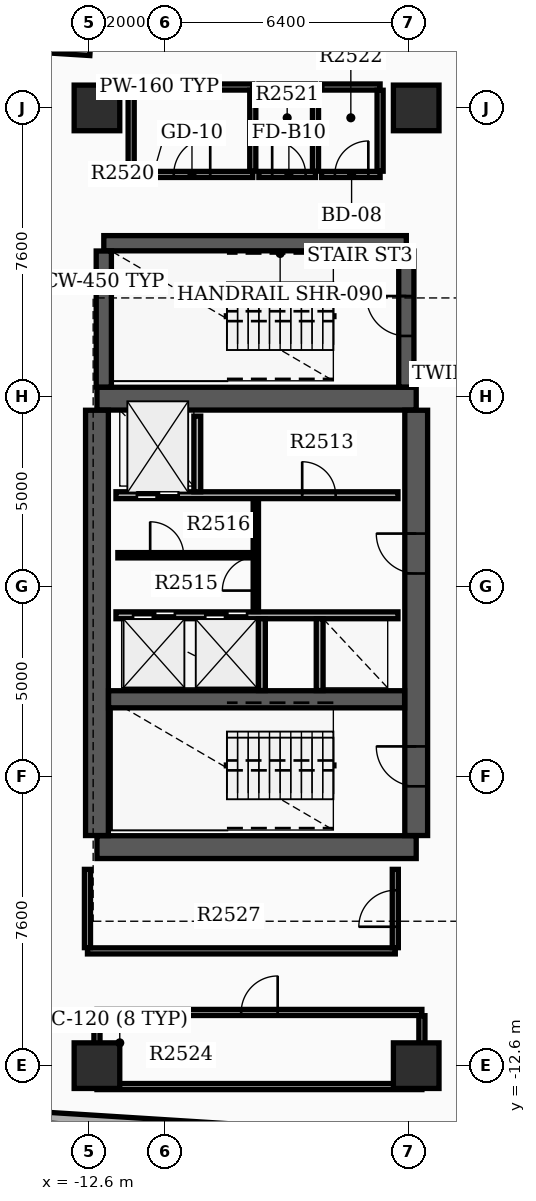
"""IFC4 building model, lengths in metres.
Left out: names, types, materials, properties, quantities, classifications, styles, units other than length and angle.
Written with IfcOpenShell. Run it as: python <this file> out.ifc"""

import sys

from ifc_helpers import new_model, si_unit, direction, frame, frame_2d, origin, origin_2d, place, context, subcontext, project, spatial, rectangle, extrude, element, fill, save


model = new_model("IFC4")
c1 = context("Model", 3, precision=1e-05, world=origin(), true_north=direction((0.0, 1.0)))
c2 = subcontext(c1, "Body", "Model", "MODEL_VIEW")
j1 = project(units=[si_unit("LENGTHUNIT", "METRE"), si_unit("PLANEANGLEUNIT", "RADIAN")], contexts=[c1])
p1 = place(None, origin())
s1 = spatial("IfcSite", under=j1, at=p1, CompositionType="ELEMENT")
p2 = place(p1, origin())
s2 = spatial("IfcBuilding", under=s1, at=p2, CompositionType="ELEMENT")
p3 = place(p2, frame((0.0, 0.0, 160.5)))
s3 = spatial("IfcBuildingStorey", under=s2, at=p3, CompositionType="ELEMENT", Elevation=160.5)
for number, where, z_axis, x_axis in (
    (1, (-12.4, -6.85, 0.0), (0.0, 0.0, 1.0), (1.0, 0.0, 0.0)),
    (2, (-12.4, 4.95, 0.0), (0.0, 0.0, 1.0), (1.0, 0.0, 0.0)),
):
    element("IfcWall", number, at=place(p3, frame(where, z_axis=z_axis, x_axis=x_axis)), inside=s3, PredefinedType="SHEAR", context=c2, shape_type="SweptSolid", body=[
        extrude(rectangle(XDim=8.4, YDim=0.6, at=frame_2d((4.2, 0.0))), origin(), (0.0, 0.0, 1.0), 3.7),
    ])
p4 = place(p3, frame((-12.4, -6.545, 0.0), z_axis=(0.0, 0.0, 1.0), x_axis=(0.0, 1.0, 0.0)))
e3 = element("IfcWall", 3, at=p4, inside=s3, PredefinedType="SHEAR", context=c2, shape_type="SweptSolid", body=[
    extrude(rectangle(XDim=11.19, YDim=0.6, at=frame_2d((5.595, 0.0))), origin(), (0.0, 0.0, 1.0), 3.7),
])
p5 = place(p3, frame((-4.0, -6.545, 0.0), z_axis=(0.0, 0.0, 1.0), x_axis=(0.0, 1.0, 0.0)))
e4 = element("IfcWall", 4, at=p5, inside=s3, PredefinedType="SHEAR", context=c2, shape_type="SweptSolid", body=[
    extrude(rectangle(XDim=11.19, YDim=0.6, at=frame_2d((5.595, 0.0))), origin(), (0.0, 0.0, 1.0), 3.7),
])
p6 = place(p5, frame((1.295, 0.0, 0.0)))
e5 = element("IfcOpeningElement", 5, at=p6, cuts=e4, PredefinedType="OPENING", context=c2, shape_type="SweptSolid", body=[
    extrude(rectangle(XDim=1.05, YDim=2.15, at=frame_2d((0.525, 1.075))), frame((0.0, 0.31, 0.0), z_axis=(0.0, -1.0, 0.0), x_axis=(1.0, 0.0, 0.0)), (0.0, 0.0, 1.0), 0.62),
])
p7 = place(p5, frame((6.895, 0.0, 0.0)))
e6 = element("IfcOpeningElement", 6, at=p7, cuts=e4, PredefinedType="OPENING", context=c2, shape_type="SweptSolid", body=[
    extrude(rectangle(XDim=1.05, YDim=2.15, at=frame_2d((0.525, 1.075))), frame((0.0, 0.31, 0.0), z_axis=(0.0, -1.0, 0.0), x_axis=(1.0, 0.0, 0.0)), (0.0, 0.0, 1.0), 0.62),
])
p8 = place(p3, frame((-12.095, -2.96, 0.0), z_axis=(0.0, 0.0, 1.0), x_axis=(1.0, 0.0, 0.0)))
e7 = element("IfcWall", 7, at=p8, inside=s3, PredefinedType="SHEAR", context=c2, shape_type="SweptSolid", body=[
    extrude(rectangle(XDim=7.79, YDim=0.45, at=frame_2d((3.895, 0.0))), origin(), (0.0, 0.0, 1.0), 3.7),
])
p9 = place(p3, frame((-12.22, 9.04, 0.0), z_axis=(0.0, 0.0, 1.0), x_axis=(1.0, 0.0, 0.0)))
e8 = element("IfcWall", 8, at=p9, inside=s3, PredefinedType="SHEAR", context=c2, shape_type="SweptSolid", body=[
    extrude(rectangle(XDim=7.96, YDim=0.4, at=frame_2d((3.98, 0.0))), origin(), (0.0, 0.0, 1.0), 3.7),
])
p10 = place(p3, frame((-12.22, 5.255, 0.0), z_axis=(0.0, 0.0, 1.0), x_axis=(0.0, 1.0, 0.0)))
e9 = element("IfcWall", 9, at=p10, inside=s3, PredefinedType="SHEAR", context=c2, shape_type="SweptSolid", body=[
    extrude(rectangle(XDim=3.58, YDim=0.4, at=frame_2d((1.79, 0.0))), origin(), (0.0, 0.0, 1.0), 3.7),
])
p11 = place(p3, frame((-4.26, 5.255, 0.0), z_axis=(0.0, 0.0, 1.0), x_axis=(0.0, 1.0, 0.0)))
e10 = element("IfcWall", 10, at=p11, inside=s3, PredefinedType="SHEAR", context=c2, shape_type="SweptSolid", body=[
    extrude(rectangle(XDim=3.58, YDim=0.4, at=frame_2d((1.79, 0.0))), origin(), (0.0, 0.0, 1.0), 3.7),
])
p12 = place(p11, frame((1.345, 0.0, 0.0)))
e11 = element("IfcOpeningElement", 11, at=p12, cuts=e10, PredefinedType="OPENING", context=c2, shape_type="SweptSolid", body=[
    extrude(rectangle(XDim=1.05, YDim=2.15, at=frame_2d((0.525, 1.075))), frame((0.0, 0.21, 0.0), z_axis=(0.0, -1.0, 0.0), x_axis=(1.0, 0.0, 0.0)), (0.0, 0.0, 1.0), 0.42),
])
for number, where, z_axis, x_axis in (
    (12, (-12.4, -12.6, 0.0), (0.0, 0.0, 1.0), (1.0, 0.0, 0.0)),
    (13, (-12.4, 12.6, 0.0), (0.0, 0.0, 1.0), (1.0, 0.0, 0.0)),
    (14, (-4.0, -12.6, 0.0), (0.0, 0.0, 1.0), (1.0, 0.0, 0.0)),
    (15, (-4.0, 12.6, 0.0), (0.0, 0.0, 1.0), (1.0, 0.0, 0.0)),
):
    element("IfcColumn", number, at=place(p3, frame(where, z_axis=z_axis, x_axis=x_axis)), inside=s3, PredefinedType="COLUMN", context=c2, shape_type="SweptSolid", body=[
        extrude(rectangle(XDim=1.2, YDim=1.2, at=origin_2d()), origin(), (0.0, 0.0, 1.0), 3.9),
    ])
p13 = place(p3, frame((-13.796, 14.194, 0.0), z_axis=(0.0, 0.0, 1.0), x_axis=(0.998023660242, -0.06283926796, 0.0)))
e16 = element("IfcWall", 16, at=p13, inside=s3, PredefinedType="STANDARD", context=c2, shape_type="SweptSolid", body=[
    extrude(rectangle(XDim=1.22, YDim=0.28, at=frame_2d((0.61, 0.0))), origin(), (0.0, 0.0, 1.0), 2.97),
])
p14 = place(p3, frame((-14.063, -13.945, 0.0), z_axis=(0.0, 0.0, 1.0), x_axis=(0.998027314704, -0.062781200242, 0.0)))
e17 = element("IfcWall", 17, at=p14, inside=s3, PredefinedType="STANDARD", context=c2, shape_type="SweptSolid", body=[
    extrude(rectangle(XDim=6.3, YDim=0.28, at=frame_2d((3.15, 0.0))), origin(), (0.0, 0.0, 1.0), 2.97),
])
p15 = place(p3, frame((-11.9, 2.41, 0.0), z_axis=(0.0, 0.0, 1.0), x_axis=(1.0, 0.0, 0.0)))
e18 = element("IfcWall", 18, at=p15, inside=s3, PredefinedType="SOLIDWALL", context=c2, shape_type="SweptSolid", body=[
    extrude(rectangle(XDim=7.42, YDim=0.18, at=frame_2d((3.71, 0.0))), origin(), (0.0, 0.0, 1.0), 2.96),
])
p16 = place(p15, frame((0.55, 0.0, 0.0)))
e19 = element("IfcOpeningElement", 19, at=p16, cuts=e18, PredefinedType="OPENING", context=c2, shape_type="SweptSolid", body=[
    extrude(rectangle(XDim=1.1, YDim=2.15, at=frame_2d((0.55, 1.075))), frame((0.0, 0.1, 0.0), z_axis=(0.0, -1.0, 0.0), x_axis=(1.0, 0.0, 0.0)), (0.0, 0.0, 1.0), 0.2),
])
p17 = place(p15, frame((4.9, 0.0, 0.0)))
e20 = element("IfcOpeningElement", 20, at=p17, cuts=e18, PredefinedType="OPENING", context=c2, shape_type="SweptSolid", body=[
    extrude(rectangle(XDim=0.88, YDim=2.1, at=frame_2d((0.44, 1.05))), frame((0.0, 0.1, 0.0), z_axis=(0.0, -1.0, 0.0), x_axis=(1.0, 0.0, 0.0)), (0.0, 0.0, 1.0), 0.2),
])
p18 = place(p3, frame((-11.9, -0.75, 0.0), z_axis=(0.0, 0.0, 1.0), x_axis=(1.0, 0.0, 0.0)))
e21 = element("IfcWall", 21, at=p18, inside=s3, PredefinedType="SOLIDWALL", context=c2, shape_type="SweptSolid", body=[
    extrude(rectangle(XDim=7.42, YDim=0.18, at=frame_2d((3.71, 0.0))), origin(), (0.0, 0.0, 1.0), 2.96),
])
p19 = place(p18, frame((0.45, 0.0, 0.0)))
e22 = element("IfcOpeningElement", 22, at=p19, cuts=e21, PredefinedType="OPENING", context=c2, shape_type="SweptSolid", body=[
    extrude(rectangle(XDim=1.1, YDim=2.15, at=frame_2d((0.55, 1.075))), frame((0.0, 0.1, 0.0), z_axis=(0.0, -1.0, 0.0), x_axis=(1.0, 0.0, 0.0)), (0.0, 0.0, 1.0), 0.2),
])
p20 = place(p18, frame((2.35, 0.0, 0.0)))
e23 = element("IfcOpeningElement", 23, at=p20, cuts=e21, PredefinedType="OPENING", context=c2, shape_type="SweptSolid", body=[
    extrude(rectangle(XDim=1.1, YDim=2.15, at=frame_2d((0.55, 1.075))), frame((0.0, 0.1, 0.0), z_axis=(0.0, -1.0, 0.0), x_axis=(1.0, 0.0, 0.0)), (0.0, 0.0, 1.0), 0.2),
])
p21 = place(p3, frame((-9.76, 2.5, 0.0), z_axis=(0.0, 0.0, 1.0), x_axis=(0.0, 1.0, 0.0)))
e24 = element("IfcWall", 24, at=p21, inside=s3, PredefinedType="SOLIDWALL", context=c2, shape_type="SweptSolid", body=[
    extrude(rectangle(XDim=1.99, YDim=0.18, at=frame_2d((0.995, 0.0))), origin(), (0.0, 0.0, 1.0), 2.96),
])
for number, where, z_axis, x_axis in (
    (25, (-8.06, -2.73, 0.0), (0.0, 0.0, 1.0), (0.0, 1.0, 0.0)),
    (26, (-6.54, -2.73, 0.0), (0.0, 0.0, 1.0), (0.0, 1.0, 0.0)),
):
    element("IfcWall", number, at=place(p3, frame(where, z_axis=z_axis, x_axis=x_axis)), inside=s3, PredefinedType="SOLIDWALL", context=c2, shape_type="SweptSolid", body=[
        extrude(rectangle(XDim=1.89, YDim=0.18, at=frame_2d((0.945, 0.0))), origin(), (0.0, 0.0, 1.0), 2.96),
    ])
p22 = place(p3, frame((-8.22, -0.65, 0.0), z_axis=(0.0, 0.0, 1.0), x_axis=(0.0, 1.0, 0.0)))
e27 = element("IfcWall", 27, at=p22, inside=s3, PredefinedType="SOLIDWALL", context=c2, shape_type="SweptSolid", body=[
    extrude(rectangle(XDim=2.96, YDim=0.14, at=frame_2d((1.48, 0.0))), origin(), (0.0, 0.0, 1.0), 2.96),
])
p23 = place(p22, frame((0.55, 0.0, 0.0)))
e28 = element("IfcOpeningElement", 28, at=p23, cuts=e27, PredefinedType="OPENING", context=c2, shape_type="SweptSolid", body=[
    extrude(rectangle(XDim=0.88, YDim=2.1, at=frame_2d((0.44, 1.05))), frame((0.0, 0.08, 0.0), z_axis=(0.0, -1.0, 0.0), x_axis=(1.0, 0.0, 0.0)), (0.0, 0.0, 1.0), 0.16),
])
p24 = place(p3, frame((-11.85, 0.83, 0.0), z_axis=(0.0, 0.0, 1.0), x_axis=(1.0, 0.0, 0.0)))
e29 = element("IfcWall", 29, at=p24, inside=s3, PredefinedType="PARTITIONING", context=c2, shape_type="SweptSolid", body=[
    extrude(rectangle(XDim=3.552, YDim=0.14, at=frame_2d((1.776, 0.0))), origin(), (0.0, 0.0, 1.0), 2.96),
])
p25 = place(p24, frame((0.85, 0.0, 0.0)))
e30 = element("IfcOpeningElement", 30, at=p25, cuts=e29, PredefinedType="OPENING", context=c2, shape_type="SweptSolid", body=[
    extrude(rectangle(XDim=0.88, YDim=2.1, at=frame_2d((0.44, 1.05))), frame((0.0, 0.08, 0.0), z_axis=(0.0, -1.0, 0.0), x_axis=(1.0, 0.0, 0.0)), (0.0, 0.0, 1.0), 0.16),
])
p26 = place(p3, frame((-11.5, 10.85, 0.0), z_axis=(0.0, 0.0, 1.0), x_axis=(1.0, 0.0, 0.0)))
e31 = element("IfcWall", 31, at=p26, inside=s3, PredefinedType="PARTITIONING", context=c2, shape_type="SweptSolid", body=[
    extrude(rectangle(XDim=3.2, YDim=0.16, at=frame_2d((1.6, 0.0))), origin(), (0.0, 0.0, 1.0), 2.96),
])
p27 = place(p26, frame((1.12, 0.0, 0.0)))
e32 = element("IfcOpeningElement", 32, at=p27, cuts=e31, PredefinedType="OPENING", context=c2, shape_type="SweptSolid", body=[
    extrude(rectangle(XDim=0.96, YDim=2.15, at=frame_2d((0.48, 1.075))), frame((0.0, 0.09, 0.0), z_axis=(0.0, -1.0, 0.0), x_axis=(1.0, 0.0, 0.0)), (0.0, 0.0, 1.0), 0.18),
])
p28 = place(p3, frame((-11.5, 13.15, 0.0), z_axis=(0.0, 0.0, 1.0), x_axis=(1.0, 0.0, 0.0)))
e33 = element("IfcWall", 33, at=p28, inside=s3, PredefinedType="PARTITIONING", context=c2, shape_type="SweptSolid", body=[
    extrude(rectangle(XDim=3.2, YDim=0.16, at=frame_2d((1.6, 0.0))), origin(), (0.0, 0.0, 1.0), 2.96),
])
for number, where, z_axis, x_axis in (
    (34, (-11.5, 10.935, 0.0), (0.0, 0.0, 1.0), (0.0, 1.0, 0.0)),
    (35, (-8.3, 10.935, 0.0), (0.0, 0.0, 1.0), (0.0, 1.0, 0.0)),
):
    element("IfcWall", number, at=place(p3, frame(where, z_axis=z_axis, x_axis=x_axis)), inside=s3, PredefinedType="PARTITIONING", context=c2, shape_type="SweptSolid", body=[
        extrude(rectangle(XDim=2.13, YDim=0.16, at=frame_2d((1.065, 0.0))), origin(), (0.0, 0.0, 1.0), 2.96),
    ])
p29 = place(p3, frame((-8.14, 10.85, 0.0), z_axis=(0.0, 0.0, 1.0), x_axis=(1.0, 0.0, 0.0)))
e36 = element("IfcWall", 36, at=p29, inside=s3, PredefinedType="PARTITIONING", context=c2, shape_type="SweptSolid", body=[
    extrude(rectangle(XDim=1.49, YDim=0.16, at=frame_2d((0.745, 0.0))), origin(), (0.0, 0.0, 1.0), 2.96),
])
p30 = place(p29, frame((0.35, 0.0, 0.0)))
e37 = element("IfcOpeningElement", 37, at=p30, cuts=e36, PredefinedType="OPENING", context=c2, shape_type="SweptSolid", body=[
    extrude(rectangle(XDim=0.88, YDim=2.1, at=frame_2d((0.44, 1.05))), frame((0.0, 0.09, 0.0), z_axis=(0.0, -1.0, 0.0), x_axis=(1.0, 0.0, 0.0)), (0.0, 0.0, 1.0), 0.18),
])
p31 = place(p3, frame((-8.14, 13.15, 0.0), z_axis=(0.0, 0.0, 1.0), x_axis=(1.0, 0.0, 0.0)))
e38 = element("IfcWall", 38, at=p31, inside=s3, PredefinedType="PARTITIONING", context=c2, shape_type="SweptSolid", body=[
    extrude(rectangle(XDim=1.49, YDim=0.16, at=frame_2d((0.745, 0.0))), origin(), (0.0, 0.0, 1.0), 2.96),
])
p32 = place(p3, frame((-6.65, 10.935, 0.0), z_axis=(0.0, 0.0, 1.0), x_axis=(0.0, 1.0, 0.0)))
e39 = element("IfcWall", 39, at=p32, inside=s3, PredefinedType="PARTITIONING", context=c2, shape_type="SweptSolid", body=[
    extrude(rectangle(XDim=2.13, YDim=0.16, at=frame_2d((1.065, 0.0))), origin(), (0.0, 0.0, 1.0), 2.96),
])
p33 = place(p3, frame((-6.49, 10.85, 0.0), z_axis=(0.0, 0.0, 1.0), x_axis=(1.0, 0.0, 0.0)))
e40 = element("IfcWall", 40, at=p33, inside=s3, PredefinedType="PARTITIONING", context=c2, shape_type="SweptSolid", body=[
    extrude(rectangle(XDim=1.54, YDim=0.16, at=frame_2d((0.77, 0.0))), origin(), (0.0, 0.0, 1.0), 2.96),
])
p34 = place(p33, frame((0.35, 0.0, 0.0)))
e41 = element("IfcOpeningElement", 41, at=p34, cuts=e40, PredefinedType="OPENING", context=c2, shape_type="SweptSolid", body=[
    extrude(rectangle(XDim=0.88, YDim=2.15, at=frame_2d((0.44, 1.075))), frame((0.0, 0.09, 0.0), z_axis=(0.0, -1.0, 0.0), x_axis=(1.0, 0.0, 0.0)), (0.0, 0.0, 1.0), 0.18),
])
p35 = place(p3, frame((-6.49, 13.15, 0.0), z_axis=(0.0, 0.0, 1.0), x_axis=(1.0, 0.0, 0.0)))
e42 = element("IfcWall", 42, at=p35, inside=s3, PredefinedType="PARTITIONING", context=c2, shape_type="SweptSolid", body=[
    extrude(rectangle(XDim=1.54, YDim=0.16, at=frame_2d((0.77, 0.0))), origin(), (0.0, 0.0, 1.0), 2.96),
])
p36 = place(p3, frame((-4.95, 10.935, 0.0), z_axis=(0.0, 0.0, 1.0), x_axis=(0.0, 1.0, 0.0)))
e43 = element("IfcWall", 43, at=p36, inside=s3, PredefinedType="PARTITIONING", context=c2, shape_type="SweptSolid", body=[
    extrude(rectangle(XDim=2.13, YDim=0.16, at=frame_2d((1.065, 0.0))), origin(), (0.0, 0.0, 1.0), 2.96),
])
p37 = place(p3, frame((-12.4, -13.15, 0.0), z_axis=(0.0, 0.0, 1.0), x_axis=(1.0, 0.0, 0.0)))
e44 = element("IfcWall", 44, at=p37, inside=s3, PredefinedType="PARTITIONING", context=c2, shape_type="SweptSolid", body=[
    extrude(rectangle(XDim=8.55, YDim=0.16, at=frame_2d((4.275, 0.0))), origin(), (0.0, 0.0, 1.0), 2.96),
])
p38 = place(p3, frame((-12.4, -11.2, 0.0), z_axis=(0.0, 0.0, 1.0), x_axis=(1.0, 0.0, 0.0)))
e45 = element("IfcWall", 45, at=p38, inside=s3, PredefinedType="PARTITIONING", context=c2, shape_type="SweptSolid", body=[
    extrude(rectangle(XDim=8.55, YDim=0.16, at=frame_2d((4.275, 0.0))), origin(), (0.0, 0.0, 1.0), 2.96),
])
p39 = place(p38, frame((3.795, 0.0, 0.0)))
e46 = element("IfcOpeningElement", 46, at=p39, cuts=e45, PredefinedType="OPENING", context=c2, shape_type="SweptSolid", body=[
    extrude(rectangle(XDim=0.96, YDim=2.15, at=frame_2d((0.48, 1.075))), frame((0.0, 0.09, 0.0), z_axis=(0.0, -1.0, 0.0), x_axis=(1.0, 0.0, 0.0)), (0.0, 0.0, 1.0), 0.18),
])
for number, where, z_axis, x_axis in (
    (47, (-12.4, -13.065, 0.0), (0.0, 0.0, 1.0), (0.0, 1.0, 0.0)),
    (48, (-3.85, -13.065, 0.0), (0.0, 0.0, 1.0), (0.0, 1.0, 0.0)),
):
    element("IfcWall", number, at=place(p3, frame(where, z_axis=z_axis, x_axis=x_axis)), inside=s3, PredefinedType="PARTITIONING", context=c2, shape_type="SweptSolid", body=[
        extrude(rectangle(XDim=1.78, YDim=0.16, at=frame_2d((0.89, 0.0))), origin(), (0.0, 0.0, 1.0), 2.96),
    ])
p40 = place(p3, frame((-12.65, -9.58, 0.0), z_axis=(0.0, 0.0, 1.0), x_axis=(1.0, 0.0, 0.0)))
e49 = element("IfcWall", 49, at=p40, inside=s3, PredefinedType="PARTITIONING", context=c2, shape_type="SweptSolid", body=[
    extrude(rectangle(XDim=8.1, YDim=0.16, at=frame_2d((4.05, 0.0))), origin(), (0.0, 0.0, 1.0), 2.96),
])
p41 = place(p3, frame((-12.65, -9.495, 0.0), z_axis=(0.0, 0.0, 1.0), x_axis=(0.0, 1.0, 0.0)))
e50 = element("IfcWall", 50, at=p41, inside=s3, PredefinedType="PARTITIONING", context=c2, shape_type="SweptSolid", body=[
    extrude(rectangle(XDim=2.06, YDim=0.16, at=frame_2d((1.03, 0.0))), origin(), (0.0, 0.0, 1.0), 2.96),
])
p42 = place(p3, frame((-4.55, -9.495, 0.0), z_axis=(0.0, 0.0, 1.0), x_axis=(0.0, 1.0, 0.0)))
e51 = element("IfcWall", 51, at=p42, inside=s3, PredefinedType="PARTITIONING", context=c2, shape_type="SweptSolid", body=[
    extrude(rectangle(XDim=2.06, YDim=0.16, at=frame_2d((1.03, 0.0))), origin(), (0.0, 0.0, 1.0), 2.96),
])
p43 = place(p42, frame((0.55, 0.0, 0.0)))
e52 = element("IfcOpeningElement", 52, at=p43, cuts=e51, PredefinedType="OPENING", context=c2, shape_type="SweptSolid", body=[
    extrude(rectangle(XDim=0.96, YDim=2.15, at=frame_2d((0.48, 1.075))), frame((0.0, 0.09, 0.0), z_axis=(0.0, -1.0, 0.0), x_axis=(1.0, 0.0, 0.0)), (0.0, 0.0, 1.0), 0.18),
])
p44 = place(p6, origin())
e53 = element("IfcDoor", 53, at=p44, inside=s3, OperationType="SINGLE_SWING_RIGHT", PredefinedType="DOOR", context=c2, shape_type="SweptSolid", body=[
    extrude(rectangle(XDim=1.05, YDim=2.15, at=frame_2d((0.525, 1.075))), frame((0.0, 0.025, 0.0), z_axis=(0.0, -1.0, 0.0), x_axis=(1.0, 0.0, 0.0)), (0.0, 0.0, 1.0), 0.05),
])
fill(e5, e53)
p45 = place(p7, origin())
e54 = element("IfcDoor", 54, at=p45, inside=s3, OperationType="SINGLE_SWING_RIGHT", PredefinedType="DOOR", context=c2, shape_type="SweptSolid", body=[
    extrude(rectangle(XDim=1.05, YDim=2.15, at=frame_2d((0.525, 1.075))), frame((0.0, 0.025, 0.0), z_axis=(0.0, -1.0, 0.0), x_axis=(1.0, 0.0, 0.0)), (0.0, 0.0, 1.0), 0.05),
])
fill(e6, e54)
p46 = place(p12, origin())
e55 = element("IfcDoor", 55, at=p46, inside=s3, OperationType="SINGLE_SWING_RIGHT", PredefinedType="DOOR", context=c2, shape_type="SweptSolid", body=[
    extrude(rectangle(XDim=1.05, YDim=2.15, at=frame_2d((0.525, 1.075))), frame((0.0, 0.025, 0.0), z_axis=(0.0, -1.0, 0.0), x_axis=(1.0, 0.0, 0.0)), (0.0, 0.0, 1.0), 0.05),
])
fill(e11, e55)
p47 = place(p16, origin())
e56 = element("IfcDoor", 56, at=p47, inside=s3, OperationType="DOUBLE_DOOR_SLIDING", PredefinedType="DOOR", context=c2, shape_type="SweptSolid", body=[
    extrude(rectangle(XDim=1.1, YDim=2.15, at=frame_2d((0.55, 1.075))), frame((0.0, 0.025, 0.0), z_axis=(0.0, -1.0, 0.0), x_axis=(1.0, 0.0, 0.0)), (0.0, 0.0, 1.0), 0.05),
])
fill(e19, e56)
p48 = place(p19, origin())
e57 = element("IfcDoor", 57, at=p48, inside=s3, OperationType="DOUBLE_DOOR_SLIDING", PredefinedType="DOOR", context=c2, shape_type="SweptSolid", body=[
    extrude(rectangle(XDim=1.1, YDim=2.15, at=frame_2d((0.55, 1.075))), frame((0.0, 0.025, 0.0), z_axis=(0.0, -1.0, 0.0), x_axis=(1.0, 0.0, 0.0)), (0.0, 0.0, 1.0), 0.05),
])
fill(e22, e57)
p49 = place(p20, origin())
e58 = element("IfcDoor", 58, at=p49, inside=s3, OperationType="DOUBLE_DOOR_SLIDING", PredefinedType="DOOR", context=c2, shape_type="SweptSolid", body=[
    extrude(rectangle(XDim=1.1, YDim=2.15, at=frame_2d((0.55, 1.075))), frame((0.0, 0.025, 0.0), z_axis=(0.0, -1.0, 0.0), x_axis=(1.0, 0.0, 0.0)), (0.0, 0.0, 1.0), 0.05),
])
fill(e23, e58)
p50 = place(p17, origin())
e59 = element("IfcDoor", 59, at=p50, inside=s3, OperationType="SINGLE_SWING_LEFT", PredefinedType="DOOR", context=c2, shape_type="SweptSolid", body=[
    extrude(rectangle(XDim=0.88, YDim=2.1, at=frame_2d((0.44, 1.05))), frame((0.0, 0.025, 0.0), z_axis=(0.0, -1.0, 0.0), x_axis=(1.0, 0.0, 0.0)), (0.0, 0.0, 1.0), 0.05),
])
fill(e20, e59)
p51 = place(p23, origin())
e60 = element("IfcDoor", 60, at=p51, inside=s3, OperationType="SINGLE_SWING_LEFT", PredefinedType="DOOR", context=c2, shape_type="SweptSolid", body=[
    extrude(rectangle(XDim=0.88, YDim=2.1, at=frame_2d((0.44, 1.05))), frame((0.0, 0.025, 0.0), z_axis=(0.0, -1.0, 0.0), x_axis=(1.0, 0.0, 0.0)), (0.0, 0.0, 1.0), 0.05),
])
fill(e28, e60)
p52 = place(p25, origin())
e61 = element("IfcDoor", 61, at=p52, inside=s3, OperationType="SINGLE_SWING_LEFT", PredefinedType="DOOR", context=c2, shape_type="SweptSolid", body=[
    extrude(rectangle(XDim=0.88, YDim=2.1, at=frame_2d((0.44, 1.05))), frame((0.0, 0.025, 0.0), z_axis=(0.0, -1.0, 0.0), x_axis=(1.0, 0.0, 0.0)), (0.0, 0.0, 1.0), 0.05),
])
fill(e30, e61)
p53 = place(p27, origin())
e62 = element("IfcDoor", 62, at=p53, inside=s3, OperationType="SINGLE_SWING_RIGHT", PredefinedType="DOOR", context=c2, shape_type="SweptSolid", body=[
    extrude(rectangle(XDim=0.96, YDim=2.15, at=frame_2d((0.48, 1.075))), frame((0.0, 0.025, 0.0), z_axis=(0.0, -1.0, 0.0), x_axis=(1.0, 0.0, 0.0)), (0.0, 0.0, 1.0), 0.05),
])
fill(e32, e62)
p54 = place(p30, origin())
e63 = element("IfcDoor", 63, at=p54, inside=s3, OperationType="SINGLE_SWING_LEFT", PredefinedType="DOOR", context=c2, shape_type="SweptSolid", body=[
    extrude(rectangle(XDim=0.88, YDim=2.1, at=frame_2d((0.44, 1.05))), frame((0.0, 0.025, 0.0), z_axis=(0.0, -1.0, 0.0), x_axis=(1.0, 0.0, 0.0)), (0.0, 0.0, 1.0), 0.05),
])
fill(e37, e63)
p55 = place(p34, origin())
e64 = element("IfcDoor", 64, at=p55, inside=s3, OperationType="SINGLE_SWING_RIGHT", PredefinedType="DOOR", context=c2, shape_type="SweptSolid", body=[
    extrude(rectangle(XDim=0.88, YDim=2.15, at=frame_2d((0.44, 1.075))), frame((0.0, 0.025, 0.0), z_axis=(0.0, -1.0, 0.0), x_axis=(1.0, 0.0, 0.0)), (0.0, 0.0, 1.0), 0.05),
])
fill(e41, e64)
p56 = place(p39, origin())
e65 = element("IfcDoor", 65, at=p56, inside=s3, OperationType="SINGLE_SWING_RIGHT", PredefinedType="DOOR", context=c2, shape_type="SweptSolid", body=[
    extrude(rectangle(XDim=0.96, YDim=2.15, at=frame_2d((0.48, 1.075))), frame((0.0, 0.025, 0.0), z_axis=(0.0, -1.0, 0.0), x_axis=(1.0, 0.0, 0.0)), (0.0, 0.0, 1.0), 0.05),
])
fill(e46, e65)
p57 = place(p43, origin())
e66 = element("IfcDoor", 66, at=p57, inside=s3, OperationType="SINGLE_SWING_LEFT", PredefinedType="DOOR", context=c2, shape_type="SweptSolid", body=[
    extrude(rectangle(XDim=0.96, YDim=2.15, at=frame_2d((0.48, 1.075))), frame((0.0, 0.025, 0.0), z_axis=(0.0, -1.0, 0.0), x_axis=(1.0, 0.0, 0.0)), (0.0, 0.0, 1.0), 0.05),
])
fill(e52, e66)
save(model, sys.argv[1])
